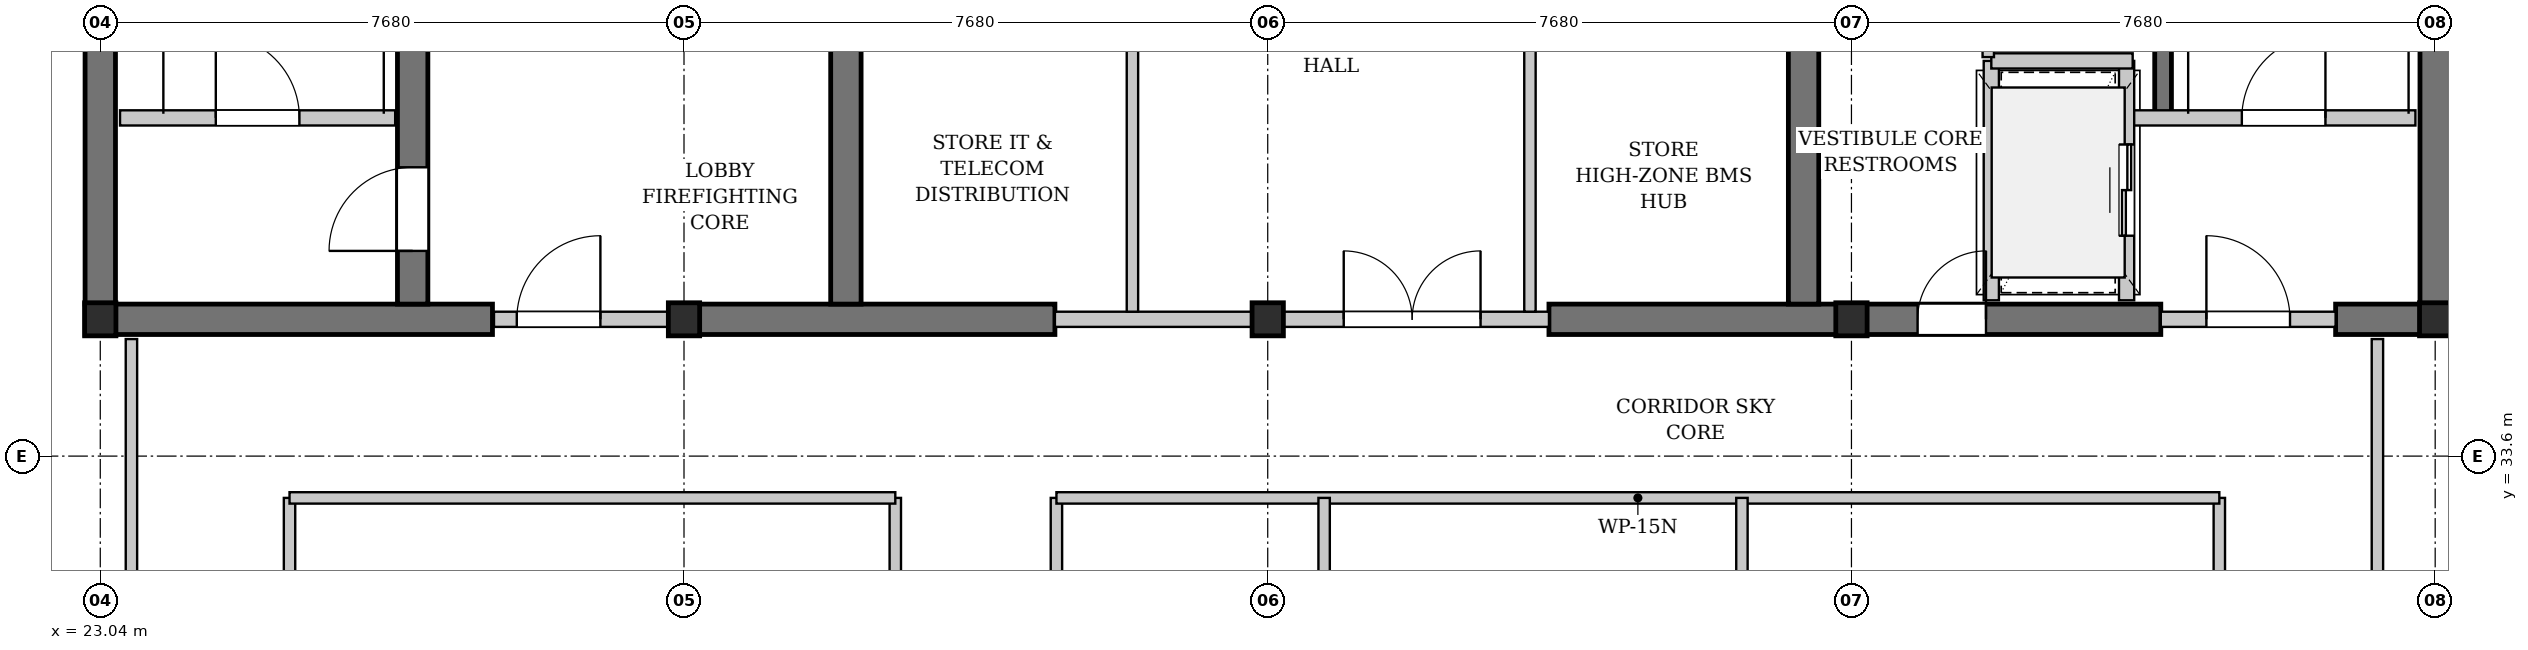
"""IFC4 building model, lengths in metres.
Left out: names, types, materials, properties, quantities, classifications, styles, units other than length and angle.
Written with IfcOpenShell. Run it as: python <this file> out.ifc"""

import sys

from ifc_helpers import new_model, si_unit, direction, frame, frame_2d, origin, origin_2d, place, context, subcontext, project, spatial, rectangle, i_section, extrude, element, fill, save


model = new_model("IFC4")
c1 = context("Model", 3, precision=1e-05, world=origin(), true_north=direction((0.0, 1.0)))
c2 = subcontext(c1, "Body", "Model", "MODEL_VIEW")
j1 = project(units=[si_unit("LENGTHUNIT", "METRE"), si_unit("PLANEANGLEUNIT", "RADIAN")], contexts=[c1])
p1 = place(None, origin())
s1 = spatial("IfcSite", under=j1, at=p1, CompositionType="ELEMENT")
p2 = place(p1, origin())
s2 = spatial("IfcBuilding", under=s1, at=p2, CompositionType="ELEMENT")
p3 = place(p2, frame((0.0, 0.0, 227.6)))
s3 = spatial("IfcBuildingStorey", under=s2, at=p3, CompositionType="ELEMENT", Elevation=227.6)
p4 = place(p3, frame((22.84, 35.4, 0.0), z_axis=(0.0, 0.0, 1.0), x_axis=(1.0, 0.0, 0.0)))
e1 = element("IfcWall", 1, at=p4, inside=s3, PredefinedType="SHEAR", context=c2, shape_type="SweptSolid", body=[
    extrude(rectangle(XDim=5.36, YDim=0.4, at=frame_2d((2.68, 0.0))), origin(), (0.0, 0.0, 1.0), 3.08),
])
p5 = place(p3, frame((30.72, 35.4, 0.0), z_axis=(0.0, 0.0, 1.0), x_axis=(1.0, 0.0, 0.0)))
e2 = element("IfcWall", 2, at=p5, inside=s3, PredefinedType="SHEAR", context=c2, shape_type="SweptSolid", body=[
    extrude(rectangle(XDim=4.88, YDim=0.4, at=frame_2d((2.44, 0.0))), origin(), (0.0, 0.0, 1.0), 3.08),
])
p6 = place(p3, frame((42.1, 35.4, 0.0), z_axis=(0.0, 0.0, 1.0), x_axis=(1.0, 0.0, 0.0)))
e3 = element("IfcWall", 3, at=p6, inside=s3, PredefinedType="SHEAR", context=c2, shape_type="SweptSolid", body=[
    extrude(rectangle(XDim=8.05, YDim=0.4, at=frame_2d((4.025, 0.0))), origin(), (0.0, 0.0, 1.0), 3.08),
])
p7 = place(p6, frame((4.85, 0.0, 0.0)))
e4 = element("IfcOpeningElement", 4, at=p7, cuts=e3, PredefinedType="OPENING", context=c2, shape_type="SweptSolid", body=[
    extrude(rectangle(XDim=0.9, YDim=2.15, at=frame_2d((0.45, 1.075))), frame((0.0, 0.21, 0.0), z_axis=(0.0, -1.0, 0.0), x_axis=(1.0, 0.0, 0.0)), (0.0, 0.0, 1.0), 0.42),
])
p8 = place(p3, frame((52.45, 35.4, 0.0), z_axis=(0.0, 0.0, 1.0), x_axis=(1.0, 0.0, 0.0)))
e5 = element("IfcWall", 5, at=p8, inside=s3, PredefinedType="SHEAR", context=c2, shape_type="SweptSolid", body=[
    extrude(rectangle(XDim=1.51, YDim=0.4, at=frame_2d((0.755, 0.0))), origin(), (0.0, 0.0, 1.0), 3.08),
])
p9 = place(p3, frame((23.04, 35.6, 0.0), z_axis=(0.0, 0.0, 1.0), x_axis=(0.0, 1.0, 0.0)))
e6 = element("IfcWall", 6, at=p9, inside=s3, PredefinedType="SHEAR", context=c2, shape_type="SweptSolid", body=[
    extrude(rectangle(XDim=10.4, YDim=0.4, at=frame_2d((5.2, 0.0))), origin(), (0.0, 0.0, 1.0), 3.08),
])
p10 = place(p3, frame((27.15, 35.6, 0.0), z_axis=(0.0, 0.0, 1.0), x_axis=(0.0, 1.0, 0.0)))
e7 = element("IfcWall", 7, at=p10, inside=s3, PredefinedType="SHEAR", context=c2, shape_type="SweptSolid", body=[
    extrude(rectangle(XDim=10.4, YDim=0.4, at=frame_2d((5.2, 0.0))), origin(), (0.0, 0.0, 1.0), 3.08),
])
p11 = place(p10, frame((0.7, 0.0, 0.0)))
e8 = element("IfcOpeningElement", 8, at=p11, cuts=e7, PredefinedType="OPENING", context=c2, shape_type="SweptSolid", body=[
    extrude(rectangle(XDim=1.1, YDim=2.15, at=frame_2d((0.55, 1.075))), frame((0.0, 0.21, 0.0), z_axis=(0.0, -1.0, 0.0), x_axis=(1.0, 0.0, 0.0)), (0.0, 0.0, 1.0), 0.42),
])
for number, where, z_axis, x_axis in (
    (9, (32.85, 35.6, 0.0), (0.0, 0.0, 1.0), (0.0, 1.0, 0.0)),
    (10, (45.45, 35.6, 0.0), (0.0, 0.0, 1.0), (0.0, 1.0, 0.0)),
    (11, (53.76, 35.6, 0.0), (0.0, 0.0, 1.0), (0.0, 1.0, 0.0)),
):
    element("IfcWall", number, at=place(p3, frame(where, z_axis=z_axis, x_axis=x_axis)), inside=s3, PredefinedType="SHEAR", context=c2, shape_type="SweptSolid", body=[
        extrude(rectangle(XDim=10.4, YDim=0.4, at=frame_2d((5.2, 0.0))), origin(), (0.0, 0.0, 1.0), 3.08),
    ])
p12 = place(p3, frame((50.18, 38.05, 0.0), z_axis=(0.0, 0.0, 1.0), x_axis=(0.0, 1.0, 0.0)))
e12 = element("IfcWall", 12, at=p12, inside=s3, PredefinedType="SHEAR", context=c2, shape_type="SweptSolid", body=[
    extrude(rectangle(XDim=7.95, YDim=0.22, at=frame_2d((3.975, 0.0))), origin(), (0.0, 0.0, 1.0), 3.08),
])
for number, where, z_axis, x_axis in (
    (13, (23.04, 35.4, 0.0), (0.0, 0.0, 1.0), (1.0, 0.0, 0.0)),
    (14, (30.72, 35.4, 0.0), (0.0, 0.0, 1.0), (1.0, 0.0, 0.0)),
    (15, (38.4, 35.4, 0.0), (0.0, 0.0, 1.0), (1.0, 0.0, 0.0)),
    (16, (46.08, 35.4, 0.0), (0.0, 0.0, 1.0), (1.0, 0.0, 0.0)),
    (17, (53.76, 35.4, 0.0), (0.0, 0.0, 1.0), (1.0, 0.0, 0.0)),
):
    element("IfcColumn", number, at=place(p3, frame(where, z_axis=z_axis, x_axis=x_axis)), inside=s3, PredefinedType="COLUMN", context=c2, shape_type="SweptSolid", body=[
        extrude(i_section(OverallWidth=0.412, OverallDepth=0.435, WebThickness=0.036, FlangeThickness=0.058, FilletRadius=0.015, at=origin_2d()), origin(), (0.0, 0.0, 1.0), 3.3),
    ])
p13 = place(p3, frame((23.3, 38.05, 0.0), z_axis=(0.0, 0.0, 1.0), x_axis=(1.0, 0.0, 0.0)))
e18 = element("IfcWall", 18, at=p13, inside=s3, PredefinedType="PARTITIONING", context=c2, shape_type="SweptSolid", body=[
    extrude(rectangle(XDim=3.62, YDim=0.2, at=frame_2d((1.81, 0.0))), origin(), (0.0, 0.0, 1.0), 3.08),
])
p14 = place(p13, frame((1.26, 0.0, 0.0)))
e19 = element("IfcOpeningElement", 19, at=p14, cuts=e18, PredefinedType="OPENING", context=c2, shape_type="SweptSolid", body=[
    extrude(rectangle(XDim=1.1, YDim=2.15, at=frame_2d((0.55, 1.075))), frame((0.0, 0.11, 0.0), z_axis=(0.0, -1.0, 0.0), x_axis=(1.0, 0.0, 0.0)), (0.0, 0.0, 1.0), 0.22),
])
p15 = place(p3, frame((28.22, 35.4, 0.0), z_axis=(0.0, 0.0, 1.0), x_axis=(1.0, 0.0, 0.0)))
e20 = element("IfcWall", 20, at=p15, inside=s3, PredefinedType="PARTITIONING", context=c2, shape_type="SweptSolid", body=[
    extrude(rectangle(XDim=2.5, YDim=0.2, at=frame_2d((1.25, 0.0))), origin(), (0.0, 0.0, 1.0), 2.313),
])
p16 = place(p15, frame((0.3, 0.0, 0.0)))
e21 = element("IfcOpeningElement", 21, at=p16, cuts=e20, PredefinedType="OPENING", context=c2, shape_type="SweptSolid", body=[
    extrude(rectangle(XDim=1.1, YDim=2.15, at=frame_2d((0.55, 1.075))), frame((0.0, 0.11, 0.0), z_axis=(0.0, -1.0, 0.0), x_axis=(1.0, 0.0, 0.0)), (0.0, 0.0, 1.0), 0.22),
])
p17 = place(p3, frame((35.6, 35.4, 0.0), z_axis=(0.0, 0.0, 1.0), x_axis=(1.0, 0.0, 0.0)))
e22 = element("IfcWall", 22, at=p17, inside=s3, PredefinedType="PARTITIONING", context=c2, shape_type="SweptSolid", body=[
    extrude(rectangle(XDim=6.5, YDim=0.2, at=frame_2d((3.25, 0.0))), origin(), (0.0, 0.0, 1.0), 2.313),
])
p18 = place(p17, frame((3.8, 0.0, 0.0)))
e23 = element("IfcOpeningElement", 23, at=p18, cuts=e22, PredefinedType="OPENING", context=c2, shape_type="SweptSolid", body=[
    extrude(rectangle(XDim=1.8, YDim=2.3, at=frame_2d((0.9, 1.15))), frame((0.0, 0.11, 0.0), z_axis=(0.0, -1.0, 0.0), x_axis=(1.0, 0.0, 0.0)), (0.0, 0.0, 1.0), 0.22),
])
p19 = place(p3, frame((36.62, 35.5, 0.0), z_axis=(0.0, 0.0, 1.0), x_axis=(0.0, 1.0, 0.0)))
e24 = element("IfcWall", 24, at=p19, inside=s3, PredefinedType="PARTITIONING", context=c2, shape_type="SweptSolid", body=[
    extrude(rectangle(XDim=10.42, YDim=0.15, at=frame_2d((5.21, 0.0))), origin(), (0.0, 0.0, 1.0), 3.08),
])
p20 = place(p19, frame((3.92, 0.0, 0.0)))
e25 = element("IfcOpeningElement", 25, at=p20, cuts=e24, PredefinedType="OPENING", context=c2, shape_type="SweptSolid", body=[
    extrude(rectangle(XDim=0.9, YDim=2.15, at=frame_2d((0.45, 1.075))), frame((0.0, 0.085, 0.0), z_axis=(0.0, -1.0, 0.0), x_axis=(1.0, 0.0, 0.0)), (0.0, 0.0, 1.0), 0.17),
])
p21 = place(p19, frame((5.85, 0.0, 0.0)))
e26 = element("IfcOpeningElement", 26, at=p21, cuts=e24, PredefinedType="OPENING", context=c2, shape_type="SweptSolid", body=[
    extrude(rectangle(XDim=0.9, YDim=2.15, at=frame_2d((0.45, 1.075))), frame((0.0, 0.085, 0.0), z_axis=(0.0, -1.0, 0.0), x_axis=(1.0, 0.0, 0.0)), (0.0, 0.0, 1.0), 0.17),
])
p22 = place(p3, frame((41.85, 35.5, 0.0), z_axis=(0.0, 0.0, 1.0), x_axis=(0.0, 1.0, 0.0)))
e27 = element("IfcWall", 27, at=p22, inside=s3, PredefinedType="PARTITIONING", context=c2, shape_type="SweptSolid", body=[
    extrude(rectangle(XDim=10.42, YDim=0.15, at=frame_2d((5.21, 0.0))), origin(), (0.0, 0.0, 1.0), 3.08),
])
p23 = place(p22, frame((3.92, 0.0, 0.0)))
e28 = element("IfcOpeningElement", 28, at=p23, cuts=e27, PredefinedType="OPENING", context=c2, shape_type="SweptSolid", body=[
    extrude(rectangle(XDim=0.9, YDim=2.15, at=frame_2d((0.45, 1.075))), frame((0.0, 0.085, 0.0), z_axis=(0.0, -1.0, 0.0), x_axis=(1.0, 0.0, 0.0)), (0.0, 0.0, 1.0), 0.17),
])
p24 = place(p22, frame((5.85, 0.0, 0.0)))
e29 = element("IfcOpeningElement", 29, at=p24, cuts=e27, PredefinedType="OPENING", context=c2, shape_type="SweptSolid", body=[
    extrude(rectangle(XDim=0.9, YDim=2.15, at=frame_2d((0.45, 1.075))), frame((0.0, 0.085, 0.0), z_axis=(0.0, -1.0, 0.0), x_axis=(1.0, 0.0, 0.0)), (0.0, 0.0, 1.0), 0.17),
])
p25 = place(p3, frame((49.78, 38.05, 0.0), z_axis=(0.0, 0.0, 1.0), x_axis=(1.0, 0.0, 0.0)))
e30 = element("IfcWall", 30, at=p25, inside=s3, PredefinedType="PARTITIONING", context=c2, shape_type="SweptSolid", body=[
    extrude(rectangle(XDim=3.72, YDim=0.2, at=frame_2d((1.86, 0.0))), origin(), (0.0, 0.0, 1.0), 3.08),
])
p26 = place(p25, frame((1.436, 0.0, 0.0)))
e31 = element("IfcOpeningElement", 31, at=p26, cuts=e30, PredefinedType="OPENING", context=c2, shape_type="SweptSolid", body=[
    extrude(rectangle(XDim=1.1, YDim=2.15, at=frame_2d((0.55, 1.075))), frame((0.0, 0.11, 0.0), z_axis=(0.0, -1.0, 0.0), x_axis=(1.0, 0.0, 0.0)), (0.0, 0.0, 1.0), 0.22),
])
p27 = place(p3, frame((50.15, 35.4, 0.0), z_axis=(0.0, 0.0, 1.0), x_axis=(1.0, 0.0, 0.0)))
e32 = element("IfcWall", 32, at=p27, inside=s3, PredefinedType="PARTITIONING", context=c2, shape_type="SweptSolid", body=[
    extrude(rectangle(XDim=2.3, YDim=0.2, at=frame_2d((1.15, 0.0))), origin(), (0.0, 0.0, 1.0), 2.313),
])
p28 = place(p27, frame((0.6, 0.0, 0.0)))
e33 = element("IfcOpeningElement", 33, at=p28, cuts=e32, PredefinedType="OPENING", context=c2, shape_type="SweptSolid", body=[
    extrude(rectangle(XDim=1.1, YDim=2.15, at=frame_2d((0.55, 1.075))), frame((0.0, 0.11, 0.0), z_axis=(0.0, -1.0, 0.0), x_axis=(1.0, 0.0, 0.0)), (0.0, 0.0, 1.0), 0.22),
])
p29 = place(p3, frame((49.7, 35.65, 0.0), z_axis=(0.0, 0.0, 1.0), x_axis=(0.0, 1.0, 0.0)))
e34 = element("IfcWall", 34, at=p29, inside=s3, PredefinedType="PARTITIONING", context=c2, shape_type="SweptSolid", body=[
    extrude(rectangle(XDim=3.15, YDim=0.2, at=frame_2d((1.575, 0.0))), origin(), (0.0, 0.0, 1.0), 3.08),
])
p30 = place(p29, frame((0.85, 0.0, 0.0)))
e35 = element("IfcOpeningElement", 35, at=p30, cuts=e34, PredefinedType="OPENING", context=c2, shape_type="SweptSolid", body=[
    extrude(rectangle(XDim=1.2, YDim=2.2, at=frame_2d((0.6, 1.1))), frame((0.0, 0.11, 0.0), z_axis=(0.0, -1.0, 0.0), x_axis=(1.0, 0.0, 0.0)), (0.0, 0.0, 1.0), 0.22),
])
p31 = place(p3, frame((47.92, 35.65, 0.0), z_axis=(0.0, 0.0, 1.0), x_axis=(0.0, 1.0, 0.0)))
e36 = element("IfcWall", 36, at=p31, inside=s3, PredefinedType="PARTITIONING", context=c2, shape_type="SweptSolid", body=[
    extrude(rectangle(XDim=3.15, YDim=0.2, at=frame_2d((1.575, 0.0))), origin(), (0.0, 0.0, 1.0), 3.08),
])
p32 = place(p3, frame((47.92, 38.8, 0.0), z_axis=(0.0, 0.0, 1.0), x_axis=(1.0, 0.0, 0.0)))
e37 = element("IfcWall", 37, at=p32, inside=s3, PredefinedType="PARTITIONING", context=c2, shape_type="SweptSolid", body=[
    extrude(rectangle(XDim=1.86, YDim=0.2, at=frame_2d((0.93, 0.0))), origin(), (0.0, 0.0, 1.0), 3.08),
])
p33 = place(p3, frame((47.88, 38.85, 0.0), z_axis=(0.0, 0.0, 1.0), x_axis=(0.0, 1.0, 0.0)))
e38 = element("IfcWall", 38, at=p33, inside=s3, PredefinedType="PARTITIONING", context=c2, shape_type="SweptSolid", body=[
    extrude(rectangle(XDim=7.07, YDim=0.15, at=frame_2d((3.535, 0.0))), origin(), (0.0, 0.0, 1.0), 3.08),
])
p34 = place(p33, frame((0.45, 0.0, 0.0)))
e39 = element("IfcOpeningElement", 39, at=p34, cuts=e38, PredefinedType="OPENING", context=c2, shape_type="SweptSolid", body=[
    extrude(rectangle(XDim=0.85, YDim=2.15, at=frame_2d((0.425, 1.075))), frame((0.0, 0.085, 0.0), z_axis=(0.0, -1.0, 0.0), x_axis=(1.0, 0.0, 0.0)), (0.0, 0.0, 1.0), 0.17),
])
p35 = place(p33, frame((2.15, 0.0, 0.0)))
e40 = element("IfcOpeningElement", 40, at=p35, cuts=e38, PredefinedType="OPENING", context=c2, shape_type="SweptSolid", body=[
    extrude(rectangle(XDim=0.95, YDim=2.15, at=frame_2d((0.475, 1.075))), frame((0.0, 0.085, 0.0), z_axis=(0.0, -1.0, 0.0), x_axis=(1.0, 0.0, 0.0)), (0.0, 0.0, 1.0), 0.17),
])
p36 = place(p33, frame((3.95, 0.0, 0.0)))
e41 = element("IfcOpeningElement", 41, at=p36, cuts=e38, PredefinedType="OPENING", context=c2, shape_type="SweptSolid", body=[
    extrude(rectangle(XDim=0.9, YDim=2.15, at=frame_2d((0.45, 1.075))), frame((0.0, 0.085, 0.0), z_axis=(0.0, -1.0, 0.0), x_axis=(1.0, 0.0, 0.0)), (0.0, 0.0, 1.0), 0.17),
])
p37 = place(p33, frame((5.65, 0.0, 0.0)))
e42 = element("IfcOpeningElement", 42, at=p37, cuts=e38, PredefinedType="OPENING", context=c2, shape_type="SweptSolid", body=[
    extrude(rectangle(XDim=0.9, YDim=2.15, at=frame_2d((0.45, 1.075))), frame((0.0, 0.085, 0.0), z_axis=(0.0, -1.0, 0.0), x_axis=(1.0, 0.0, 0.0)), (0.0, 0.0, 1.0), 0.17),
])
p38 = place(p3, frame((23.45, 21.35, 0.0), z_axis=(0.0, 0.0, 1.0), x_axis=(0.0, 1.0, 0.0)))
e43 = element("IfcWall", 43, at=p38, inside=s3, PredefinedType="PARTITIONING", context=c2, shape_type="SweptSolid", body=[
    extrude(rectangle(XDim=13.79, YDim=0.15, at=frame_2d((6.895, 0.0))), origin(), (0.0, 0.0, 1.0), 3.08),
])
p39 = place(p38, frame((1.03, 0.0, 0.0)))
e44 = element("IfcOpeningElement", 44, at=p39, cuts=e43, PredefinedType="OPENING", context=c2, shape_type="SweptSolid", body=[
    extrude(rectangle(XDim=0.9, YDim=2.15, at=frame_2d((0.45, 1.075))), frame((0.0, 0.085, 0.0), z_axis=(0.0, -1.0, 0.0), x_axis=(1.0, 0.0, 0.0)), (0.0, 0.0, 1.0), 0.17),
])
p40 = place(p3, frame((53.0, 21.35, 0.0), z_axis=(0.0, 0.0, 1.0), x_axis=(0.0, 1.0, 0.0)))
e45 = element("IfcWall", 45, at=p40, inside=s3, PredefinedType="PARTITIONING", context=c2, shape_type="SweptSolid", body=[
    extrude(rectangle(XDim=13.79, YDim=0.15, at=frame_2d((6.895, 0.0))), origin(), (0.0, 0.0, 1.0), 3.08),
])
p41 = place(p40, frame((1.03, 0.0, 0.0)))
e46 = element("IfcOpeningElement", 46, at=p41, cuts=e45, PredefinedType="OPENING", context=c2, shape_type="SweptSolid", body=[
    extrude(rectangle(XDim=0.9, YDim=2.15, at=frame_2d((0.45, 1.075))), frame((0.0, 0.085, 0.0), z_axis=(0.0, -1.0, 0.0), x_axis=(1.0, 0.0, 0.0)), (0.0, 0.0, 1.0), 0.17),
])
for number, where, z_axis, x_axis in (
    (47, (25.53, 23.43, 0.0), (0.0, 0.0, 1.0), (0.0, 1.0, 0.0)),
    (48, (50.92, 23.43, 0.0), (0.0, 0.0, 1.0), (0.0, 1.0, 0.0)),
    (49, (33.5, 23.43, 0.0), (0.0, 0.0, 1.0), (0.0, 1.0, 0.0)),
    (50, (35.62, 23.43, 0.0), (0.0, 0.0, 1.0), (0.0, 1.0, 0.0)),
):
    element("IfcWall", number, at=place(p3, frame(where, z_axis=z_axis, x_axis=x_axis)), inside=s3, PredefinedType="PARTITIONING", context=c2, shape_type="SweptSolid", body=[
        extrude(rectangle(XDim=9.62, YDim=0.15, at=frame_2d((4.81, 0.0))), origin(), (0.0, 0.0, 1.0), 3.08),
    ])
p42 = place(p3, frame((25.53, 33.05, 0.0), z_axis=(0.0, 0.0, 1.0), x_axis=(1.0, 0.0, 0.0)))
e51 = element("IfcWall", 51, at=p42, inside=s3, PredefinedType="PARTITIONING", context=c2, shape_type="SweptSolid", body=[
    extrude(rectangle(XDim=7.97, YDim=0.15, at=frame_2d((3.985, 0.0))), origin(), (0.0, 0.0, 1.0), 3.08),
])
p43 = place(p3, frame((35.62, 33.05, 0.0), z_axis=(0.0, 0.0, 1.0), x_axis=(1.0, 0.0, 0.0)))
e52 = element("IfcWall", 52, at=p43, inside=s3, PredefinedType="PARTITIONING", context=c2, shape_type="SweptSolid", body=[
    extrude(rectangle(XDim=15.3, YDim=0.15, at=frame_2d((7.65, 0.0))), origin(), (0.0, 0.0, 1.0), 3.08),
])
for number, where, z_axis, x_axis in (
    (53, (39.142, 23.43, 0.0), (0.0, 0.0, 1.0), (0.0, 1.0, 0.0)),
    (54, (44.639, 23.43, 0.0), (0.0, 0.0, 1.0), (0.0, 1.0, 0.0)),
):
    element("IfcWall", number, at=place(p3, frame(where, z_axis=z_axis, x_axis=x_axis)), inside=s3, PredefinedType="PARTITIONING", context=c2, shape_type="SweptSolid", body=[
        extrude(rectangle(XDim=9.62, YDim=0.15, at=frame_2d((4.81, 0.0))), origin(), (0.0, 0.0, 1.0), 3.08),
    ])
p44 = place(p14, origin())
e55 = element("IfcDoor", 55, at=p44, inside=s3, OperationType="SINGLE_SWING_LEFT", PredefinedType="DOOR", context=c2, shape_type="SweptSolid", body=[
    extrude(rectangle(XDim=1.1, YDim=2.15, at=frame_2d((0.55, 1.075))), frame((0.0, 0.025, 0.0), z_axis=(0.0, -1.0, 0.0), x_axis=(1.0, 0.0, 0.0)), (0.0, 0.0, 1.0), 0.05),
])
fill(e19, e55)
p45 = place(p16, origin())
e56 = element("IfcDoor", 56, at=p45, inside=s3, OperationType="SINGLE_SWING_RIGHT", PredefinedType="DOOR", context=c2, shape_type="SweptSolid", body=[
    extrude(rectangle(XDim=1.1, YDim=2.15, at=frame_2d((0.55, 1.075))), frame((0.0, 0.025, 0.0), z_axis=(0.0, -1.0, 0.0), x_axis=(1.0, 0.0, 0.0)), (0.0, 0.0, 1.0), 0.05),
])
fill(e21, e56)
p46 = place(p18, origin())
e57 = element("IfcDoor", 57, at=p46, inside=s3, OperationType="DOUBLE_DOOR_SINGLE_SWING", PredefinedType="DOOR", context=c2, shape_type="SweptSolid", body=[
    extrude(rectangle(XDim=1.8, YDim=2.3, at=frame_2d((0.9, 1.15))), frame((0.0, 0.025, 0.0), z_axis=(0.0, -1.0, 0.0), x_axis=(1.0, 0.0, 0.0)), (0.0, 0.0, 1.0), 0.05),
])
fill(e23, e57)
p47 = place(p26, origin())
e58 = element("IfcDoor", 58, at=p47, inside=s3, OperationType="SINGLE_SWING_RIGHT", PredefinedType="DOOR", context=c2, shape_type="SweptSolid", body=[
    extrude(rectangle(XDim=1.1, YDim=2.15, at=frame_2d((0.55, 1.075))), frame((0.0, 0.025, 0.0), z_axis=(0.0, -1.0, 0.0), x_axis=(1.0, 0.0, 0.0)), (0.0, 0.0, 1.0), 0.05),
])
fill(e31, e58)
p48 = place(p28, origin())
e59 = element("IfcDoor", 59, at=p48, inside=s3, OperationType="SINGLE_SWING_LEFT", PredefinedType="DOOR", context=c2, shape_type="SweptSolid", body=[
    extrude(rectangle(XDim=1.1, YDim=2.15, at=frame_2d((0.55, 1.075))), frame((0.0, 0.025, 0.0), z_axis=(0.0, -1.0, 0.0), x_axis=(1.0, 0.0, 0.0)), (0.0, 0.0, 1.0), 0.05),
])
fill(e33, e59)
p49 = place(p30, origin())
e60 = element("IfcDoor", 60, at=p49, inside=s3, OperationType="DOUBLE_DOOR_SLIDING", PredefinedType="DOOR", context=c2, shape_type="SweptSolid", body=[
    extrude(rectangle(XDim=1.2, YDim=2.2, at=frame_2d((0.6, 1.1))), frame((0.0, 0.025, 0.0), z_axis=(0.0, -1.0, 0.0), x_axis=(1.0, 0.0, 0.0)), (0.0, 0.0, 1.0), 0.05),
])
fill(e35, e60)
p50 = place(p11, origin())
e61 = element("IfcDoor", 61, at=p50, inside=s3, OperationType="SINGLE_SWING_LEFT", PredefinedType="DOOR", context=c2, shape_type="SweptSolid", body=[
    extrude(rectangle(XDim=1.1, YDim=2.15, at=frame_2d((0.55, 1.075))), frame((0.0, 0.025, 0.0), z_axis=(0.0, -1.0, 0.0), x_axis=(1.0, 0.0, 0.0)), (0.0, 0.0, 1.0), 0.05),
])
fill(e8, e61)
p51 = place(p7, origin())
e62 = element("IfcDoor", 62, at=p51, inside=s3, OperationType="SINGLE_SWING_RIGHT", PredefinedType="DOOR", context=c2, shape_type="SweptSolid", body=[
    extrude(rectangle(XDim=0.9, YDim=2.15, at=frame_2d((0.45, 1.075))), frame((0.0, 0.025, 0.0), z_axis=(0.0, -1.0, 0.0), x_axis=(1.0, 0.0, 0.0)), (0.0, 0.0, 1.0), 0.05),
])
fill(e4, e62)
save(model, sys.argv[1])
